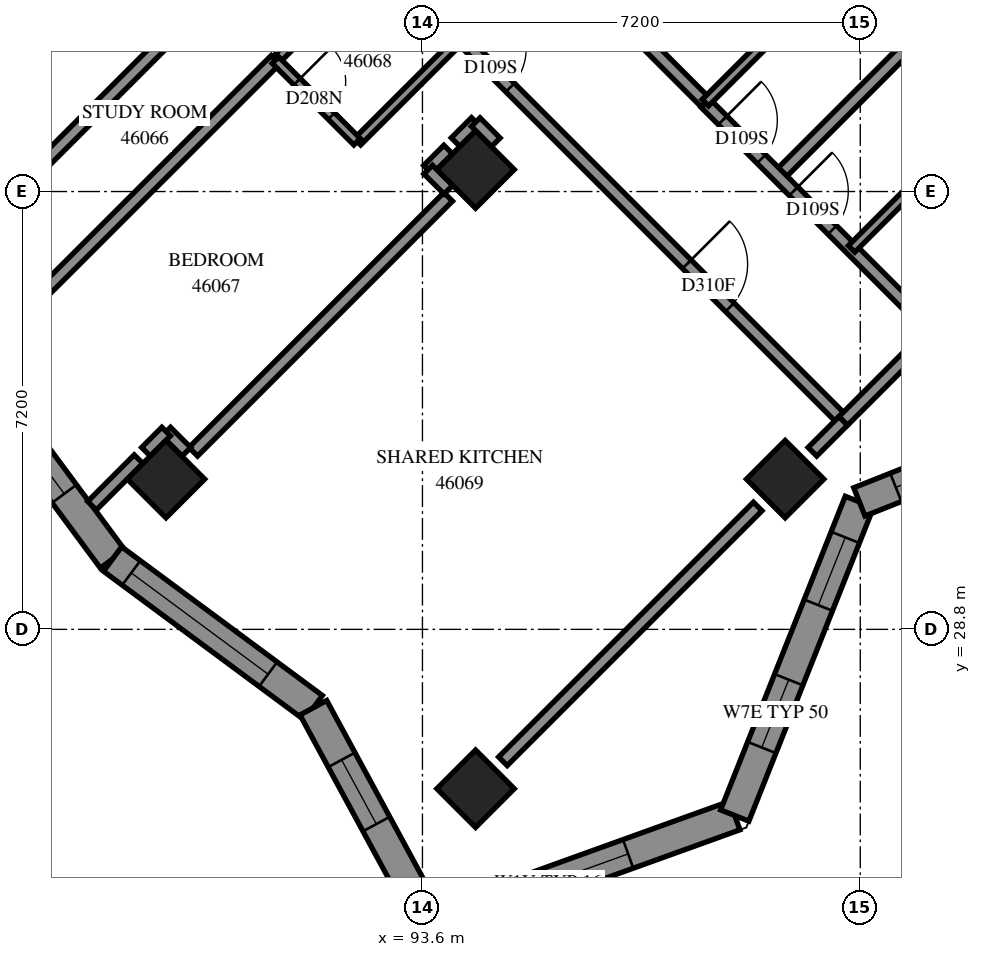
"""IFC4 building model, lengths in metres.
Left out: names, types, materials, properties, quantities, classifications, styles, units other than length and angle.
Written with IfcOpenShell. Run it as: python <this file> out.ifc"""

import sys

from ifc_helpers import new_model, si_unit, direction, frame, frame_2d, origin, origin_2d, place, context, subcontext, project, spatial, polyline, rectangle, outline, extrude, element, fill, save


model = new_model("IFC4")
c1 = context("Model", 3, precision=1e-05, world=origin(), true_north=direction((0.0, 1.0)))
c2 = subcontext(c1, "Body", "Model", "MODEL_VIEW")
j1 = project(units=[si_unit("LENGTHUNIT", "METRE"), si_unit("PLANEANGLEUNIT", "RADIAN")], contexts=[c1])
p1 = place(None, origin())
s1 = spatial("IfcSite", under=j1, at=p1, CompositionType="ELEMENT")
p2 = place(p1, origin())
s2 = spatial("IfcBuilding", under=s1, at=p2, CompositionType="ELEMENT")
p3 = place(p2, frame((0.0, 0.0, 169.4)))
s3 = spatial("IfcBuildingStorey", under=s2, at=p3, CompositionType="ELEMENT", Elevation=169.4)
for number, where, z_axis, x_axis in (
    (1, (94.474, 36.362, 0.0), (0.0, 0.0, 1.0), (0.707, -0.707, 0.0)),
    (2, (89.382, 31.271, 0.0), (0.0, 0.0, 1.0), (0.707, -0.707, 0.0)),
    (3, (99.565, 31.271, 0.0), (0.0, 0.0, 1.0), (0.707, -0.707, 0.0)),
    (4, (94.474, 26.18, 0.0), (0.0, 0.0, 1.0), (0.707, -0.707, 0.0)),
):
    element("IfcColumn", number, at=place(p3, frame(where, z_axis=z_axis, x_axis=x_axis)), inside=s3, PredefinedType="COLUMN", context=c2, shape_type="SweptSolid", body=[
        extrude(rectangle(XDim=0.9, YDim=0.9, at=origin_2d()), origin(), (0.0, 0.0, 1.0), 3.1),
    ])
p4 = place(p3, frame((93.74, 23.94, 0.0), z_axis=(0.0, 0.0, 1.0), x_axis=(0.9408725254, 0.3387608166, 0.0)))
e5 = element("IfcWall", 5, at=p4, inside=s3, PredefinedType="SOLIDWALL", context=c2, shape_type="SweptSolid", body=[
    extrude(outline(polyline([(-0.215, -0.25), (5.422, -0.25), (5.197, 0.25), (0.215, 0.25), (-0.215, -0.25)])), origin(), (0.0, 0.0, 1.0), 3.1),
])
p5 = place(p4, frame((0.646, 0.0, 0.45)))
e6 = element("IfcOpeningElement", 6, at=p5, cuts=e5, PredefinedType="OPENING", context=c2, shape_type="SweptSolid", body=[
    extrude(rectangle(XDim=2.8, YDim=2.5, at=frame_2d((1.4, 1.25))), frame((0.0, 0.26, 0.0), z_axis=(0.0, -1.0, 0.0), x_axis=(1.0, 0.0, 0.0)), (0.0, 0.0, 1.0), 0.52),
])
p6 = place(p3, frame((98.736, 25.738, 0.0), z_axis=(0.0, 0.0, 1.0), x_axis=(0.3692368727, 0.9293353172, 0.0)))
e7 = element("IfcWall", 7, at=p6, inside=s3, PredefinedType="SOLIDWALL", context=c2, shape_type="SweptSolid", body=[
    extrude(outline(polyline([(-0.113, -0.25), (5.442, -0.25), (5.658, 0.25), (0.113, 0.25), (-0.113, -0.25)])), origin(), (0.0, 0.0, 1.0), 3.1),
])
p7 = place(p6, frame((1.204, 0.0, 0.45)))
e8 = element("IfcOpeningElement", 8, at=p7, cuts=e7, PredefinedType="OPENING", context=c2, shape_type="SweptSolid", body=[
    extrude(rectangle(XDim=1.2, YDim=2.5, at=frame_2d((0.6, 1.25))), frame((0.0, 0.26, 0.0), z_axis=(0.0, -1.0, 0.0), x_axis=(1.0, 0.0, 0.0)), (0.0, 0.0, 1.0), 0.52),
])
p8 = place(p6, frame((3.722, 0.0, 0.45)))
e9 = element("IfcOpeningElement", 9, at=p8, cuts=e7, PredefinedType="OPENING", context=c2, shape_type="SweptSolid", body=[
    extrude(rectangle(XDim=1.2, YDim=2.5, at=frame_2d((0.6, 1.25))), frame((0.0, 0.26, 0.0), z_axis=(0.0, -1.0, 0.0), x_axis=(1.0, 0.0, 0.0)), (0.0, 0.0, 1.0), 0.52),
])
p9 = place(p3, frame((100.785, 30.896, 0.0), z_axis=(0.0, 0.0, 1.0), x_axis=(0.9293291345, 0.3692524338, 0.0)))
e10 = element("IfcWall", 10, at=p9, inside=s3, PredefinedType="SOLIDWALL", context=c2, shape_type="SweptSolid", body=[
    extrude(outline(polyline([(0.108, -0.25), (5.663, -0.25), (5.437, 0.25), (-0.108, 0.25), (0.108, -0.25)])), origin(), (0.0, 0.0, 1.0), 3.1),
])
p10 = place(p9, frame((0.645, 0.0, 0.45)))
e11 = element("IfcOpeningElement", 11, at=p10, cuts=e10, PredefinedType="OPENING", context=c2, shape_type="SweptSolid", body=[
    extrude(rectangle(XDim=2.8, YDim=2.5, at=frame_2d((1.4, 1.25))), frame((0.0, 0.26, 0.0), z_axis=(0.0, -1.0, 0.0), x_axis=(1.0, 0.0, 0.0)), (0.0, 0.0, 1.0), 0.52),
])
p11 = place(p3, frame((86.07, 33.244, 0.0), z_axis=(0.0, 0.0, 1.0), x_axis=(0.5951427759, -0.8036199825, 0.0)))
e12 = element("IfcWall", 12, at=p11, inside=s3, PredefinedType="SOLIDWALL", context=c2, shape_type="SweptSolid", body=[
    extrude(outline(polyline([(0.037, -0.25), (4.128, -0.25), (4.053, 0.25), (-0.037, 0.25), (0.037, -0.25)])), origin(), (0.0, 0.0, 1.0), 3.1),
])
p12 = place(p11, frame((0.956, 0.0, 0.7)))
e13 = element("IfcOpeningElement", 13, at=p12, cuts=e12, PredefinedType="OPENING", context=c2, shape_type="SweptSolid", body=[
    extrude(rectangle(XDim=1.8, YDim=2.2, at=frame_2d((0.9, 1.1))), frame((0.0, 0.26, 0.0), z_axis=(0.0, -1.0, 0.0), x_axis=(1.0, 0.0, 0.0)), (0.0, 0.0, 1.0), 0.52),
])
p13 = place(p3, frame((88.504, 29.956, 0.0), z_axis=(0.0, 0.0, 1.0), x_axis=(0.8036097892, -0.5951565397, 0.0)))
e14 = element("IfcWall", 14, at=p13, inside=s3, PredefinedType="SOLIDWALL", context=c2, shape_type="SweptSolid", body=[
    extrude(outline(polyline([(-0.037, -0.25), (4.053, -0.25), (4.164, 0.25), (0.037, 0.25), (-0.037, -0.25)])), origin(), (0.0, 0.0, 1.0), 3.1),
])
p14 = place(p13, frame((0.383, 0.0, 0.45)))
e15 = element("IfcOpeningElement", 15, at=p14, cuts=e14, PredefinedType="OPENING", context=c2, shape_type="SweptSolid", body=[
    extrude(rectangle(XDim=2.8, YDim=2.5, at=frame_2d((1.4, 1.25))), frame((0.0, 0.26, 0.0), z_axis=(0.0, -1.0, 0.0), x_axis=(1.0, 0.0, 0.0)), (0.0, 0.0, 1.0), 0.52),
])
p15 = place(p3, frame((91.806, 27.511, 0.0), z_axis=(0.0, 0.0, 1.0), x_axis=(0.4762538008, -0.8793078626, 0.0)))
e16 = element("IfcWall", 16, at=p15, inside=s3, PredefinedType="SOLIDWALL", context=c2, shape_type="SweptSolid", body=[
    extrude(outline(polyline([(0.056, -0.25), (4.277, -0.25), (3.847, 0.25), (-0.056, 0.25), (0.056, -0.25)])), origin(), (0.0, 0.0, 1.0), 3.1),
])
p16 = place(p15, frame((0.975, 0.0, 0.45)))
e17 = element("IfcOpeningElement", 17, at=p16, cuts=e16, PredefinedType="OPENING", context=c2, shape_type="SweptSolid", body=[
    extrude(rectangle(XDim=1.2, YDim=2.5, at=frame_2d((0.6, 1.25))), frame((0.0, 0.26, 0.0), z_axis=(0.0, -1.0, 0.0), x_axis=(1.0, 0.0, 0.0)), (0.0, 0.0, 1.0), 0.52),
])
p17 = place(p3, frame((91.967, 40.785, 0.0), z_axis=(0.0, 0.0, 1.0), x_axis=(0.7071067812, -0.7071067812, 0.0)))
e18 = element("IfcWall", 18, at=p17, inside=s3, PredefinedType="PARTITIONING", context=c2, shape_type="SweptSolid", body=[
    extrude(rectangle(XDim=12.1, YDim=0.2, at=frame_2d((6.05, 0.0))), origin(), (0.0, 0.0, 1.0), 3.1),
])
p18 = place(p17, frame((3.448, 0.0, 0.0)))
e19 = element("IfcOpeningElement", 19, at=p18, cuts=e18, PredefinedType="OPENING", context=c2, shape_type="SweptSolid", body=[
    extrude(rectangle(XDim=0.9, YDim=2.1, at=frame_2d((0.45, 1.05))), frame((0.0, 0.11, 0.0), z_axis=(0.0, -1.0, 0.0), x_axis=(1.0, 0.0, 0.0)), (0.0, 0.0, 1.0), 0.22),
])
p19 = place(p17, frame((8.457, 0.0, 0.0)))
e20 = element("IfcOpeningElement", 20, at=p19, cuts=e18, PredefinedType="OPENING", context=c2, shape_type="SweptSolid", body=[
    extrude(rectangle(XDim=1.0, YDim=2.1, at=frame_2d((0.5, 1.05))), frame((0.0, 0.11, 0.0), z_axis=(0.0, -1.0, 0.0), x_axis=(1.0, 0.0, 0.0)), (0.0, 0.0, 1.0), 0.22),
])
p20 = place(p3, frame((86.834, 35.94, 0.0), z_axis=(0.0, 0.0, 1.0), x_axis=(0.7072486139, 0.7069649201, 0.0)))
e21 = element("IfcWall", 21, at=p20, inside=s3, PredefinedType="PARTITIONING", context=c2, shape_type="SweptSolid", body=[
    extrude(rectangle(XDim=7.05, YDim=0.2, at=frame_2d((3.525, 0.0))), origin(), (0.0, 0.0, 1.0), 3.1),
])
p21 = place(p20, frame((5.848, 0.0, 0.0)))
e22 = element("IfcOpeningElement", 22, at=p21, cuts=e21, PredefinedType="OPENING", context=c2, shape_type="SweptSolid", body=[
    extrude(rectangle(XDim=1.0, YDim=2.1, at=frame_2d((0.5, 1.05))), frame((0.0, 0.11, 0.0), z_axis=(0.0, -1.0, 0.0), x_axis=(1.0, 0.0, 0.0)), (0.0, 0.0, 1.0), 0.22),
])
p22 = place(p3, frame((86.329, 33.313, 0.0), z_axis=(0.0, 0.0, 1.0), x_axis=(0.7072524502, 0.7069610821, 0.0)))
e23 = element("IfcWall", 23, at=p22, inside=s3, PredefinedType="PARTITIONING", context=c2, shape_type="SweptSolid", body=[
    extrude(rectangle(XDim=6.864, YDim=0.2, at=frame_2d((3.432, 0.0))), origin(), (0.0, 0.0, 1.0), 3.1),
])
p23 = place(p3, frame((99.458, 36.256, 0.0), z_axis=(0.0, 0.0, 1.0), x_axis=(0.7071067812, 0.7071067812, 0.0)))
e24 = element("IfcWall", 24, at=p23, inside=s3, PredefinedType="PARTITIONING", context=c2, shape_type="SweptSolid", body=[
    extrude(rectangle(XDim=6.85, YDim=0.2, at=frame_2d((3.425, 0.0))), origin(), (0.0, 0.0, 1.0), 3.1),
])
p24 = place(p3, frame((89.831, 31.721, 0.0), z_axis=(0.0, 0.0, 1.0), x_axis=(0.7071067812, 0.7071067812, 0.0)))
e25 = element("IfcWall", 25, at=p24, inside=s3, PredefinedType="PARTITIONING", context=c2, shape_type="SweptSolid", body=[
    extrude(rectangle(XDim=5.928, YDim=0.2, at=frame_2d((2.964, 0.0))), origin(), (0.0, 0.0, 1.0), 3.1),
])
p25 = place(p3, frame((94.923, 26.631, 0.0), z_axis=(0.0, 0.0, 1.0), x_axis=(0.7071067812, 0.7071067812, 0.0)))
e26 = element("IfcWall", 26, at=p25, inside=s3, PredefinedType="PARTITIONING", context=c2, shape_type="SweptSolid", body=[
    extrude(rectangle(XDim=5.926, YDim=0.2, at=frame_2d((2.963, 0.0))), origin(), (0.0, 0.0, 1.0), 2.6),
])
p26 = place(p3, frame((98.253, 37.455, 0.0), z_axis=(0.0, 0.0, 1.0), x_axis=(0.7071067812, -0.7071067812, 0.0)))
e27 = element("IfcWall", 27, at=p26, inside=s3, PredefinedType="PARTITIONING", context=c2, shape_type="SweptSolid", body=[
    extrude(rectangle(XDim=5.301, YDim=0.2, at=frame_2d((2.65, 0.0))), origin(), (0.0, 0.0, 1.0), 3.1),
])
p27 = place(p26, frame((0.401, 0.0, 0.0)))
e28 = element("IfcOpeningElement", 28, at=p27, cuts=e27, PredefinedType="OPENING", context=c2, shape_type="SweptSolid", body=[
    extrude(rectangle(XDim=0.9, YDim=2.1, at=frame_2d((0.45, 1.05))), frame((0.0, 0.11, 0.0), z_axis=(0.0, -1.0, 0.0), x_axis=(1.0, 0.0, 0.0)), (0.0, 0.0, 1.0), 0.22),
])
p28 = place(p26, frame((2.05, 0.0, 0.0)))
e29 = element("IfcOpeningElement", 29, at=p28, cuts=e27, PredefinedType="OPENING", context=c2, shape_type="SweptSolid", body=[
    extrude(rectangle(XDim=0.9, YDim=2.1, at=frame_2d((0.45, 1.05))), frame((0.0, 0.11, 0.0), z_axis=(0.0, -1.0, 0.0), x_axis=(1.0, 0.0, 0.0)), (0.0, 0.0, 1.0), 0.22),
])
p29 = place(p3, frame((95.573, 40.148, 0.0), z_axis=(0.0, 0.0, 1.0), x_axis=(0.7068698107, -0.7073436723, 0.0)))
e30 = element("IfcWall", 30, at=p29, inside=s3, PredefinedType="PARTITIONING", context=c2, shape_type="SweptSolid", body=[
    extrude(rectangle(XDim=3.799, YDim=0.2, at=frame_2d((1.899, 0.0))), origin(), (0.0, 0.0, 1.0), 3.1),
])
for number, where, z_axis, x_axis in (
    (31, (98.253, 37.461, 0.0), (0.0, 0.0, 1.0), (0.708, 0.707, 0.0)),
    (32, (100.657, 35.057, 0.0), (0.0, 0.0, 1.0), (0.708, 0.707, 0.0)),
    (33, (91.189, 38.161, 0.0), (0.0, 0.0, 1.0), (0.707, 0.708, 0.0)),
    (34, (92.531, 36.819, 0.0), (0.0, 0.0, 1.0), (0.708, 0.707, 0.0)),
):
    element("IfcWall", number, at=place(p3, frame(where, z_axis=z_axis, x_axis=x_axis)), inside=s3, PredefinedType="PARTITIONING", context=c2, shape_type="SweptSolid", body=[
        extrude(rectangle(XDim=2.4, YDim=0.15, at=frame_2d((1.2, 0.0))), origin(), (0.0, 0.0, 1.0), 3.1),
    ])
p30 = place(p3, frame((100.519, 32.227, 0.0), z_axis=(0.0, 0.0, 1.0), x_axis=(0.7071067812, 0.7071067812, 0.0)))
e35 = element("IfcWall", 35, at=p30, inside=s3, PredefinedType="PARTITIONING", context=c2, shape_type="SweptSolid", body=[
    extrude(rectangle(XDim=2.099, YDim=0.2, at=frame_2d((1.049, 0.0))), origin(), (0.0, 0.0, 1.0), 2.6),
])
p31 = place(p3, frame((91.183, 38.161, 0.0), z_axis=(0.0, 0.0, 1.0), x_axis=(0.7071067812, -0.7071067812, 0.0)))
e36 = element("IfcWall", 36, at=p31, inside=s3, PredefinedType="PARTITIONING", context=c2, shape_type="SweptSolid", body=[
    extrude(rectangle(XDim=1.898, YDim=0.15, at=frame_2d((0.949, 0.0))), origin(), (0.0, 0.0, 1.0), 3.1),
])
p32 = place(p31, frame((0.501, 0.0, 0.0)))
e37 = element("IfcOpeningElement", 37, at=p32, cuts=e36, PredefinedType="OPENING", context=c2, shape_type="SweptSolid", body=[
    extrude(rectangle(XDim=0.8, YDim=2.1, at=frame_2d((0.4, 1.05))), frame((0.0, 0.085, 0.0), z_axis=(0.0, -1.0, 0.0), x_axis=(1.0, 0.0, 0.0)), (0.0, 0.0, 1.0), 0.17),
])
p33 = place(p3, frame((88.166, 30.834, 0.0), z_axis=(0.0, 0.0, 1.0), x_axis=(0.7071067812, 0.7071067812, 0.0)))
e38 = element("IfcWall", 38, at=p33, inside=s3, PredefinedType="PARTITIONING", context=c2, shape_type="SweptSolid", body=[
    extrude(rectangle(XDim=1.082, YDim=0.2, at=frame_2d((0.541, 0.0))), origin(), (0.0, 0.0, 1.0), 3.1),
])
p34 = place(p3, frame((100.013, 31.721, 0.0), z_axis=(0.0, 0.0, 1.0), x_axis=(0.7071067812, 0.7071067812, 0.0)))
e39 = element("IfcWall", 39, at=p34, inside=s3, PredefinedType="PARTITIONING", context=c2, shape_type="SweptSolid", body=[
    extrude(rectangle(XDim=0.716, YDim=0.2, at=frame_2d((0.358, 0.0))), origin(), (0.0, 0.0, 1.0), 2.6),
])
for number, where, z_axis, x_axis in (
    (40, (94.145, 36.813, 0.0), (0.0, 0.0, 1.0), (0.707, 0.707, 0.0)),
    (41, (89.386, 32.052, 0.0), (0.0, 0.0, 1.0), (0.707, -0.707, 0.0)),
    (42, (89.053, 31.721, 0.0), (0.0, 0.0, 1.0), (0.707, 0.707, 0.0)),
    (43, (93.691, 36.359, 0.0), (0.0, 0.0, 1.0), (0.707, 0.707, 0.0)),
):
    element("IfcWall", number, at=place(p3, frame(where, z_axis=z_axis, x_axis=x_axis)), inside=s3, PredefinedType="PARTITIONING", context=c2, shape_type="SweptSolid", body=[
        extrude(rectangle(XDim=0.469, YDim=0.2, at=frame_2d((0.235, 0.0))), origin(), (0.0, 0.0, 1.0), 3.1),
    ])
for number, where, z_axis, x_axis in (
    (44, (94.476, 37.142, 0.0), (0.0, 0.0, 1.0), (0.705, -0.709, 0.0)),
    (45, (93.695, 36.361, 0.0), (0.0, 0.0, 1.0), (0.709, -0.705, 0.0)),
):
    element("IfcWall", number, at=place(p3, frame(where, z_axis=z_axis, x_axis=x_axis)), inside=s3, PredefinedType="PARTITIONING", context=c2, shape_type="SweptSolid", body=[
        extrude(rectangle(XDim=0.468, YDim=0.2, at=frame_2d((0.234, 0.0))), origin(), (0.0, 0.0, 1.0), 3.1),
    ])
p35 = place(p5, origin())
e46 = element("IfcWindow", 46, at=p35, inside=s3, PartitioningType="SINGLE_PANEL", PredefinedType="WINDOW", context=c2, shape_type="SweptSolid", body=[
    extrude(rectangle(XDim=2.8, YDim=2.5, at=frame_2d((1.4, 1.25))), frame((0.0, 0.18, 0.0), z_axis=(0.0, -1.0, 0.0), x_axis=(1.0, 0.0, 0.0)), (0.0, 0.0, 1.0), 0.06),
])
fill(e6, e46)
p36 = place(p7, origin())
e47 = element("IfcWindow", 47, at=p36, inside=s3, PartitioningType="SINGLE_PANEL", PredefinedType="WINDOW", context=c2, shape_type="SweptSolid", body=[
    extrude(rectangle(XDim=1.2, YDim=2.5, at=frame_2d((0.6, 1.25))), frame((0.0, 0.18, 0.0), z_axis=(0.0, -1.0, 0.0), x_axis=(1.0, 0.0, 0.0)), (0.0, 0.0, 1.0), 0.06),
])
fill(e8, e47)
p37 = place(p8, origin())
e48 = element("IfcWindow", 48, at=p37, inside=s3, PartitioningType="SINGLE_PANEL", PredefinedType="WINDOW", context=c2, shape_type="SweptSolid", body=[
    extrude(rectangle(XDim=1.2, YDim=2.5, at=frame_2d((0.6, 1.25))), frame((0.0, 0.18, 0.0), z_axis=(0.0, -1.0, 0.0), x_axis=(1.0, 0.0, 0.0)), (0.0, 0.0, 1.0), 0.06),
])
fill(e9, e48)
p38 = place(p10, origin())
e49 = element("IfcWindow", 49, at=p38, inside=s3, PartitioningType="SINGLE_PANEL", PredefinedType="WINDOW", context=c2, shape_type="SweptSolid", body=[
    extrude(rectangle(XDim=2.8, YDim=2.5, at=frame_2d((1.4, 1.25))), frame((0.0, 0.18, 0.0), z_axis=(0.0, -1.0, 0.0), x_axis=(1.0, 0.0, 0.0)), (0.0, 0.0, 1.0), 0.06),
])
fill(e11, e49)
p39 = place(p14, origin())
e50 = element("IfcWindow", 50, at=p39, inside=s3, PartitioningType="SINGLE_PANEL", PredefinedType="WINDOW", context=c2, shape_type="SweptSolid", body=[
    extrude(rectangle(XDim=2.8, YDim=2.5, at=frame_2d((1.4, 1.25))), frame((0.0, 0.18, 0.0), z_axis=(0.0, -1.0, 0.0), x_axis=(1.0, 0.0, 0.0)), (0.0, 0.0, 1.0), 0.06),
])
fill(e15, e50)
p40 = place(p16, origin())
e51 = element("IfcWindow", 51, at=p40, inside=s3, PartitioningType="SINGLE_PANEL", PredefinedType="WINDOW", context=c2, shape_type="SweptSolid", body=[
    extrude(rectangle(XDim=1.2, YDim=2.5, at=frame_2d((0.6, 1.25))), frame((0.0, 0.18, 0.0), z_axis=(0.0, -1.0, 0.0), x_axis=(1.0, 0.0, 0.0)), (0.0, 0.0, 1.0), 0.06),
])
fill(e17, e51)
p41 = place(p27, origin())
e52 = element("IfcDoor", 52, at=p41, inside=s3, OperationType="SINGLE_SWING_LEFT", PredefinedType="DOOR", context=c2, shape_type="SweptSolid", body=[
    extrude(rectangle(XDim=0.9, YDim=2.1, at=frame_2d((0.45, 1.05))), frame((0.0, 0.025, 0.0), z_axis=(0.0, -1.0, 0.0), x_axis=(1.0, 0.0, 0.0)), (0.0, 0.0, 1.0), 0.05),
])
fill(e28, e52)
p42 = place(p18, origin())
e53 = element("IfcDoor", 53, at=p42, inside=s3, OperationType="SINGLE_SWING_LEFT", PredefinedType="DOOR", context=c2, shape_type="SweptSolid", body=[
    extrude(rectangle(XDim=0.9, YDim=2.1, at=frame_2d((0.45, 1.05))), frame((0.0, 0.025, 0.0), z_axis=(0.0, -1.0, 0.0), x_axis=(1.0, 0.0, 0.0)), (0.0, 0.0, 1.0), 0.05),
])
fill(e19, e53)
p43 = place(p32, origin())
e54 = element("IfcDoor", 54, at=p43, inside=s3, OperationType="SINGLE_SWING_RIGHT", PredefinedType="DOOR", context=c2, shape_type="SweptSolid", body=[
    extrude(rectangle(XDim=0.8, YDim=2.1, at=frame_2d((0.4, 1.05))), frame((0.0, 0.025, 0.0), z_axis=(0.0, -1.0, 0.0), x_axis=(1.0, 0.0, 0.0)), (0.0, 0.0, 1.0), 0.05),
])
fill(e37, e54)
p44 = place(p19, origin())
e55 = element("IfcDoor", 55, at=p44, inside=s3, OperationType="SINGLE_SWING_RIGHT", PredefinedType="DOOR", context=c2, shape_type="SweptSolid", body=[
    extrude(rectangle(XDim=1.0, YDim=2.1, at=frame_2d((0.5, 1.05))), frame((0.0, 0.025, 0.0), z_axis=(0.0, -1.0, 0.0), x_axis=(1.0, 0.0, 0.0)), (0.0, 0.0, 1.0), 0.05),
])
fill(e20, e55)
p45 = place(p28, origin())
e56 = element("IfcDoor", 56, at=p45, inside=s3, OperationType="SINGLE_SWING_RIGHT", PredefinedType="DOOR", context=c2, shape_type="SweptSolid", body=[
    extrude(rectangle(XDim=0.9, YDim=2.1, at=frame_2d((0.45, 1.05))), frame((0.0, 0.025, 0.0), z_axis=(0.0, -1.0, 0.0), x_axis=(1.0, 0.0, 0.0)), (0.0, 0.0, 1.0), 0.05),
])
fill(e29, e56)
p46 = place(p12, origin())
e57 = element("IfcWindow", 57, at=p46, inside=s3, PartitioningType="SINGLE_PANEL", PredefinedType="WINDOW", context=c2, shape_type="SweptSolid", body=[
    extrude(rectangle(XDim=1.8, YDim=2.2, at=frame_2d((0.9, 1.1))), frame((0.0, 0.18, 0.0), z_axis=(0.0, -1.0, 0.0), x_axis=(1.0, 0.0, 0.0)), (0.0, 0.0, 1.0), 0.06),
])
fill(e13, e57)
save(model, sys.argv[1])
